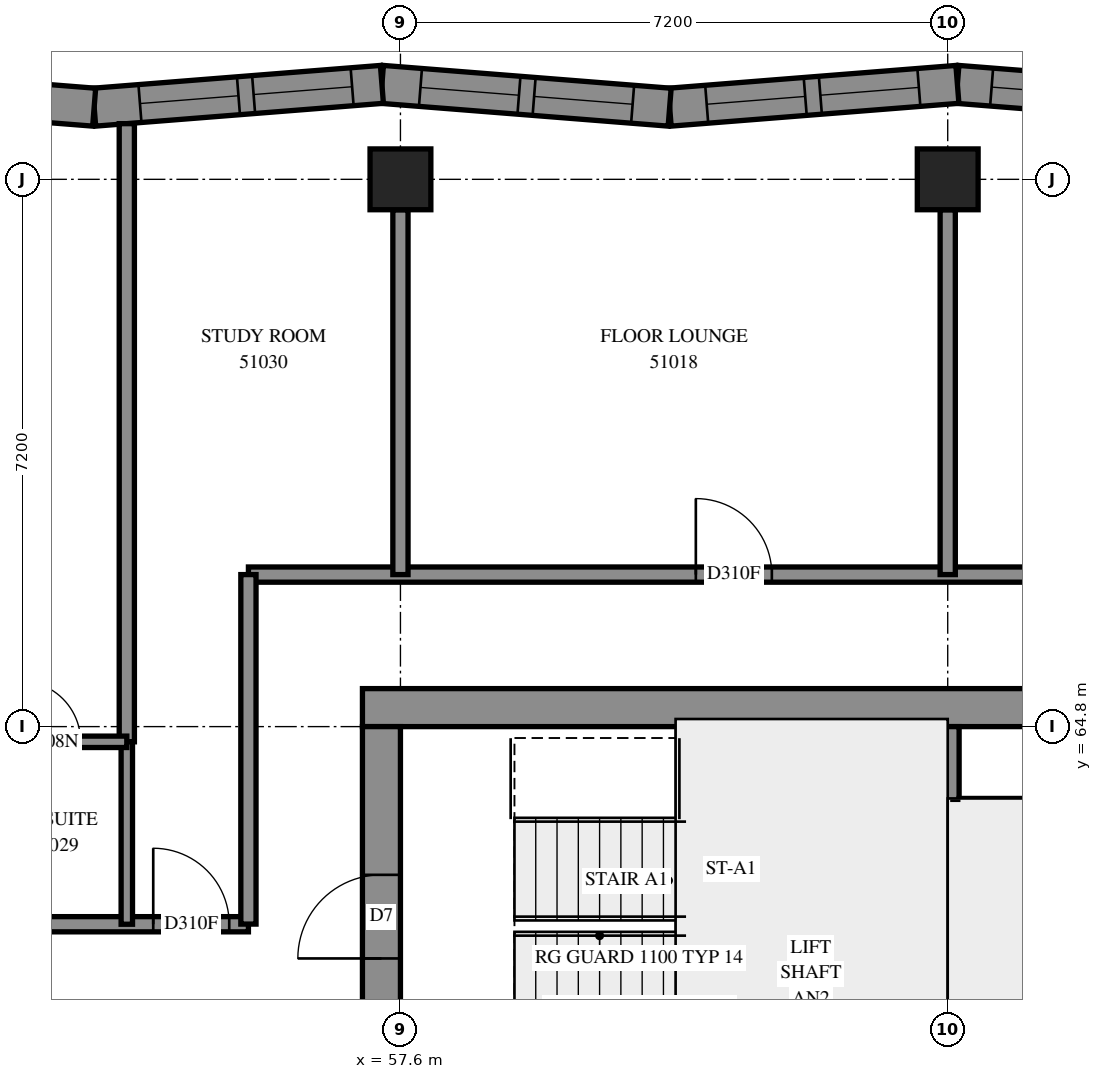
"""IFC4 building model, lengths in metres.
Left out: names, types, materials, properties, quantities, classifications, styles, units other than length and angle.
Written with IfcOpenShell. Run it as: python <this file> out.ifc"""

import sys

from ifc_helpers import new_model, si_unit, direction, frame, frame_2d, origin, origin_2d, place, context, subcontext, project, spatial, polyline, rectangle, outline, extrude, element, fill, save


model = new_model("IFC4")
c1 = context("Model", 3, precision=1e-05, world=origin(), true_north=direction((0.0, 1.0)))
c2 = subcontext(c1, "Body", "Model", "MODEL_VIEW")
j1 = project(units=[si_unit("LENGTHUNIT", "METRE"), si_unit("PLANEANGLEUNIT", "RADIAN")], contexts=[c1])
p1 = place(None, origin())
s1 = spatial("IfcSite", under=j1, at=p1, CompositionType="ELEMENT")
p2 = place(p1, origin())
s2 = spatial("IfcBuilding", under=s1, at=p2, CompositionType="ELEMENT")
p3 = place(p2, frame((0.0, 0.0, 189.6)))
s3 = spatial("IfcBuildingStorey", under=s2, at=p3, CompositionType="ELEMENT", Elevation=189.6)
for number, where, z_axis, x_axis in (
    (1, (57.6, 72.0, 0.0), (0.0, 0.0, 1.0), (1.0, 0.0, 0.0)),
    (2, (64.8, 72.0, 0.0), (0.0, 0.0, 1.0), (1.0, 0.0, 0.0)),
):
    element("IfcColumn", number, at=place(p3, frame(where, z_axis=z_axis, x_axis=x_axis)), inside=s3, PredefinedType="COLUMN", context=c2, shape_type="SweptSolid", body=[
        extrude(rectangle(XDim=0.8, YDim=0.8, at=origin_2d()), origin(), (0.0, 0.0, 1.0), 3.1),
    ])
p4 = place(p3, frame((57.1, 65.05, -0.3), z_axis=(0.0, 0.0, 1.0), x_axis=(1.0, 0.0, 0.0)))
e3 = element("IfcWall", 3, at=p4, inside=s3, PredefinedType="SHEAR", context=c2, shape_type="SweptSolid", body=[
    extrude(rectangle(XDim=15.4, YDim=0.5, at=frame_2d((7.7, 0.0))), origin(), (0.0, 0.0, 1.0), 2.7),
])
p5 = place(p4, frame((10.5, 0.0, 0.3)))
e4 = element("IfcOpeningElement", 4, at=p5, cuts=e3, PredefinedType="OPENING", context=c2, shape_type="SweptSolid", body=[
    extrude(rectangle(XDim=0.8, YDim=2.1, at=frame_2d((0.4, 1.05))), frame((0.0, 0.26, 0.0), z_axis=(0.0, -1.0, 0.0), x_axis=(1.0, 0.0, 0.0)), (0.0, 0.0, 1.0), 0.52),
])
p6 = place(p3, frame((57.35, 50.4, -0.3), z_axis=(0.0, 0.0, 1.0), x_axis=(0.0, 1.0, 0.0)))
e5 = element("IfcWall", 5, at=p6, inside=s3, PredefinedType="SHEAR", context=c2, shape_type="SweptSolid", body=[
    extrude(rectangle(XDim=14.4, YDim=0.5, at=frame_2d((7.2, 0.0))), origin(), (0.0, 0.0, 1.0), 2.7),
])
p7 = place(p6, frame((4.55, 0.0, 0.3)))
e6 = element("IfcOpeningElement", 6, at=p7, cuts=e5, PredefinedType="OPENING", context=c2, shape_type="SweptSolid", body=[
    extrude(rectangle(XDim=1.1, YDim=2.1, at=frame_2d((0.55, 1.05))), frame((0.0, 0.26, 0.0), z_axis=(0.0, -1.0, 0.0), x_axis=(1.0, 0.0, 0.0)), (0.0, 0.0, 1.0), 0.52),
])
p8 = place(p6, frame((11.35, 0.0, 0.3)))
e7 = element("IfcOpeningElement", 7, at=p8, cuts=e5, PredefinedType="OPENING", context=c2, shape_type="SweptSolid", body=[
    extrude(rectangle(XDim=1.1, YDim=2.1, at=frame_2d((0.55, 1.05))), frame((0.0, 0.26, 0.0), z_axis=(0.0, -1.0, 0.0), x_axis=(1.0, 0.0, 0.0)), (0.0, 0.0, 1.0), 0.52),
])
p9 = place(p3, frame((64.8, 60.6, 0.0), z_axis=(0.0, 0.0, 1.0), x_axis=(0.0, 1.0, 0.0)))
e8 = element("IfcWall", 8, at=p9, inside=s3, PredefinedType="SOLIDWALL", context=c2, shape_type="SweptSolid", body=[
    extrude(rectangle(XDim=4.2, YDim=0.3, at=frame_2d((2.1, 0.0))), origin(), (0.0, 0.0, 1.0), 3.1),
])
p10 = place(p3, frame((68.713, 72.949, 0.0), z_axis=(0.0, 0.0, 1.0), x_axis=(-0.9968746163, 0.078999996, 0.0)))
e9 = element("IfcWall", 9, at=p10, inside=s3, PredefinedType="SOLIDWALL", context=c2, shape_type="SweptSolid", body=[
    extrude(outline(polyline([(0.02, -0.25), (3.817, -0.25), (3.778, 0.25), (-0.02, 0.25), (0.02, -0.25)])), origin(), (0.0, 0.0, 1.0), 3.1),
])
p11 = place(p10, frame((0.546, 0.0, 0.45)))
e10 = element("IfcOpeningElement", 10, at=p11, cuts=e9, PredefinedType="OPENING", context=c2, shape_type="SweptSolid", body=[
    extrude(rectangle(XDim=1.3, YDim=2.5, at=frame_2d((0.65, 1.25))), frame((0.0, 0.26, 0.0), z_axis=(0.0, -1.0, 0.0), x_axis=(1.0, 0.0, 0.0)), (0.0, 0.0, 1.0), 0.52),
])
p12 = place(p10, frame((2.046, 0.0, 0.45)))
e11 = element("IfcOpeningElement", 11, at=p12, cuts=e9, PredefinedType="OPENING", context=c2, shape_type="SweptSolid", body=[
    extrude(rectangle(XDim=1.3, YDim=2.5, at=frame_2d((0.65, 1.25))), frame((0.0, 0.26, 0.0), z_axis=(0.0, -1.0, 0.0), x_axis=(1.0, 0.0, 0.0)), (0.0, 0.0, 1.0), 0.52),
])
p13 = place(p3, frame((64.927, 73.249, 0.0), z_axis=(0.0, 0.0, 1.0), x_axis=(-0.9968746163, -0.078999996, 0.0)))
e12 = element("IfcWall", 12, at=p13, inside=s3, PredefinedType="SOLIDWALL", context=c2, shape_type="SweptSolid", body=[
    extrude(outline(polyline([(-0.02, -0.25), (3.778, -0.25), (3.817, 0.25), (0.02, 0.25), (-0.02, -0.25)])), origin(), (0.0, 0.0, 1.0), 3.1),
])
p14 = place(p13, frame((0.509, 0.0, 0.45)))
e13 = element("IfcOpeningElement", 13, at=p14, cuts=e12, PredefinedType="OPENING", context=c2, shape_type="SweptSolid", body=[
    extrude(rectangle(XDim=1.3, YDim=2.5, at=frame_2d((0.65, 1.25))), frame((0.0, 0.26, 0.0), z_axis=(0.0, -1.0, 0.0), x_axis=(1.0, 0.0, 0.0)), (0.0, 0.0, 1.0), 0.52),
])
p15 = place(p13, frame((2.009, 0.0, 0.45)))
e14 = element("IfcOpeningElement", 14, at=p15, cuts=e12, PredefinedType="OPENING", context=c2, shape_type="SweptSolid", body=[
    extrude(rectangle(XDim=1.3, YDim=2.5, at=frame_2d((0.65, 1.25))), frame((0.0, 0.26, 0.0), z_axis=(0.0, -1.0, 0.0), x_axis=(1.0, 0.0, 0.0)), (0.0, 0.0, 1.0), 0.52),
])
p16 = place(p3, frame((61.142, 72.949, 0.0), z_axis=(0.0, 0.0, 1.0), x_axis=(-0.9968746163, 0.078999996, 0.0)))
e15 = element("IfcWall", 15, at=p16, inside=s3, PredefinedType="SOLIDWALL", context=c2, shape_type="SweptSolid", body=[
    extrude(outline(polyline([(0.02, -0.25), (3.817, -0.25), (3.778, 0.25), (-0.02, 0.25), (0.02, -0.25)])), origin(), (0.0, 0.0, 1.0), 3.1),
])
p17 = place(p16, frame((0.489, 0.0, 0.45)))
e16 = element("IfcOpeningElement", 16, at=p17, cuts=e15, PredefinedType="OPENING", context=c2, shape_type="SweptSolid", body=[
    extrude(rectangle(XDim=1.3, YDim=2.5, at=frame_2d((0.65, 1.25))), frame((0.0, 0.26, 0.0), z_axis=(0.0, -1.0, 0.0), x_axis=(1.0, 0.0, 0.0)), (0.0, 0.0, 1.0), 0.52),
])
p18 = place(p16, frame((1.989, 0.0, 0.45)))
e17 = element("IfcOpeningElement", 17, at=p18, cuts=e15, PredefinedType="OPENING", context=c2, shape_type="SweptSolid", body=[
    extrude(rectangle(XDim=1.3, YDim=2.5, at=frame_2d((0.65, 1.25))), frame((0.0, 0.26, 0.0), z_axis=(0.0, -1.0, 0.0), x_axis=(1.0, 0.0, 0.0)), (0.0, 0.0, 1.0), 0.52),
])
p19 = place(p3, frame((57.356, 73.249, 0.0), z_axis=(0.0, 0.0, 1.0), x_axis=(-0.9968746163, -0.078999996, 0.0)))
e18 = element("IfcWall", 18, at=p19, inside=s3, PredefinedType="SOLIDWALL", context=c2, shape_type="SweptSolid", body=[
    extrude(outline(polyline([(-0.02, -0.25), (3.778, -0.25), (3.817, 0.25), (0.02, 0.25), (-0.02, -0.25)])), origin(), (0.0, 0.0, 1.0), 3.1),
])
p20 = place(p19, frame((0.393, 0.0, 0.45)))
e19 = element("IfcOpeningElement", 19, at=p20, cuts=e18, PredefinedType="OPENING", context=c2, shape_type="SweptSolid", body=[
    extrude(rectangle(XDim=1.3, YDim=2.5, at=frame_2d((0.65, 1.25))), frame((0.0, 0.26, 0.0), z_axis=(0.0, -1.0, 0.0), x_axis=(1.0, 0.0, 0.0)), (0.0, 0.0, 1.0), 0.52),
])
p21 = place(p19, frame((1.893, 0.0, 0.45)))
e20 = element("IfcOpeningElement", 20, at=p21, cuts=e18, PredefinedType="OPENING", context=c2, shape_type="SweptSolid", body=[
    extrude(rectangle(XDim=1.3, YDim=2.5, at=frame_2d((0.65, 1.25))), frame((0.0, 0.26, 0.0), z_axis=(0.0, -1.0, 0.0), x_axis=(1.0, 0.0, 0.0)), (0.0, 0.0, 1.0), 0.52),
])
p22 = place(p3, frame((53.571, 72.949, 0.0), z_axis=(0.0, 0.0, 1.0), x_axis=(-0.9968747806, 0.0789979222, 0.0)))
e21 = element("IfcWall", 21, at=p22, inside=s3, PredefinedType="SOLIDWALL", context=c2, shape_type="SweptSolid", body=[
    extrude(outline(polyline([(0.02, -0.25), (3.817, -0.25), (3.778, 0.25), (-0.02, 0.25), (0.02, -0.25)])), origin(), (0.0, 0.0, 1.0), 3.1),
])
p23 = place(p22, frame((1.09, 0.0, 0.45)))
e22 = element("IfcOpeningElement", 22, at=p23, cuts=e21, PredefinedType="OPENING", context=c2, shape_type="SweptSolid", body=[
    extrude(rectangle(XDim=1.2, YDim=2.5, at=frame_2d((0.6, 1.25))), frame((0.0, 0.26, 0.0), z_axis=(0.0, -1.0, 0.0), x_axis=(1.0, 0.0, 0.0)), (0.0, 0.0, 1.0), 0.52),
])
p24 = place(p3, frame((64.95, 63.78, 0.0), z_axis=(0.0, 0.0, 1.0), x_axis=(1.0, 0.0, 0.0)))
e23 = element("IfcWall", 23, at=p24, inside=s3, PredefinedType="PARTITIONING", context=c2, shape_type="SweptSolid", body=[
    extrude(rectangle(XDim=5.95, YDim=0.15, at=frame_2d((2.975, 0.0))), origin(), (0.0, 0.0, 1.0), 3.1),
])
p25 = place(p3, frame((55.6, 66.8, 0.0), z_axis=(0.0, 0.0, 1.0), x_axis=(1.0, 0.0, 0.0)))
e24 = element("IfcWall", 24, at=p25, inside=s3, PredefinedType="PARTITIONING", context=c2, shape_type="SweptSolid", body=[
    extrude(rectangle(XDim=18.4, YDim=0.2, at=frame_2d((9.2, 0.0))), origin(), (0.0, 0.0, 1.0), 3.1),
])
p26 = place(p25, frame((5.886, 0.0, 0.0)))
e25 = element("IfcOpeningElement", 25, at=p26, cuts=e24, PredefinedType="OPENING", context=c2, shape_type="SweptSolid", body=[
    extrude(rectangle(XDim=1.0, YDim=2.1, at=frame_2d((0.5, 1.05))), frame((0.0, 0.11, 0.0), z_axis=(0.0, -1.0, 0.0), x_axis=(1.0, 0.0, 0.0)), (0.0, 0.0, 1.0), 0.22),
])
p27 = place(p25, frame((13.389, 0.0, 0.0)))
e26 = element("IfcOpeningElement", 26, at=p27, cuts=e24, PredefinedType="OPENING", context=c2, shape_type="SweptSolid", body=[
    extrude(rectangle(XDim=1.0, YDim=2.1, at=frame_2d((0.5, 1.05))), frame((0.0, 0.11, 0.0), z_axis=(0.0, -1.0, 0.0), x_axis=(1.0, 0.0, 0.0)), (0.0, 0.0, 1.0), 0.22),
])
p28 = place(p3, frame((40.602, 62.2, 0.0), z_axis=(0.0, 0.0, 1.0), x_axis=(1.0, 0.0, 0.0)))
e27 = element("IfcWall", 27, at=p28, inside=s3, PredefinedType="PARTITIONING", context=c2, shape_type="SweptSolid", body=[
    extrude(rectangle(XDim=14.998, YDim=0.2, at=frame_2d((7.499, 0.0))), origin(), (0.0, 0.0, 1.0), 3.1),
])
p29 = place(p28, frame((1.306, 0.0, 0.0)))
e28 = element("IfcOpeningElement", 28, at=p29, cuts=e27, PredefinedType="OPENING", context=c2, shape_type="SweptSolid", body=[
    extrude(rectangle(XDim=0.9, YDim=2.1, at=frame_2d((0.45, 1.05))), frame((0.0, 0.11, 0.0), z_axis=(0.0, -1.0, 0.0), x_axis=(1.0, 0.0, 0.0)), (0.0, 0.0, 1.0), 0.22),
])
p30 = place(p28, frame((8.548, 0.0, 0.0)))
e29 = element("IfcOpeningElement", 29, at=p30, cuts=e27, PredefinedType="OPENING", context=c2, shape_type="SweptSolid", body=[
    extrude(rectangle(XDim=0.9, YDim=2.1, at=frame_2d((0.45, 1.05))), frame((0.0, 0.11, 0.0), z_axis=(0.0, -1.0, 0.0), x_axis=(1.0, 0.0, 0.0)), (0.0, 0.0, 1.0), 0.22),
])
p31 = place(p28, frame((10.198, 0.0, 0.0)))
e30 = element("IfcOpeningElement", 30, at=p31, cuts=e27, PredefinedType="OPENING", context=c2, shape_type="SweptSolid", body=[
    extrude(rectangle(XDim=0.9, YDim=2.1, at=frame_2d((0.45, 1.05))), frame((0.0, 0.11, 0.0), z_axis=(0.0, -1.0, 0.0), x_axis=(1.0, 0.0, 0.0)), (0.0, 0.0, 1.0), 0.22),
])
p32 = place(p28, frame((13.746, 0.0, 0.0)))
e31 = element("IfcOpeningElement", 31, at=p32, cuts=e27, PredefinedType="OPENING", context=c2, shape_type="SweptSolid", body=[
    extrude(rectangle(XDim=1.0, YDim=2.1, at=frame_2d((0.5, 1.05))), frame((0.0, 0.11, 0.0), z_axis=(0.0, -1.0, 0.0), x_axis=(1.0, 0.0, 0.0)), (0.0, 0.0, 1.0), 0.22),
])
p33 = place(p3, frame((54.0, 64.6, 0.0), z_axis=(0.0, 0.0, 1.0), x_axis=(0.0, 1.0, 0.0)))
e32 = element("IfcWall", 32, at=p33, inside=s3, PredefinedType="PARTITIONING", context=c2, shape_type="SweptSolid", body=[
    extrude(rectangle(XDim=8.133, YDim=0.2, at=frame_2d((4.066, 0.0))), origin(), (0.0, 0.0, 1.0), 3.1),
])
for number, where, z_axis, x_axis in (
    (33, (57.6, 66.8, 0.0), (0.0, 0.0, 1.0), (0.0, 1.0, 0.0)),
    (34, (64.8, 66.8, 0.0), (0.0, 0.0, 1.0), (0.0, 1.0, 0.0)),
):
    element("IfcWall", number, at=place(p3, frame(where, z_axis=z_axis, x_axis=x_axis)), inside=s3, PredefinedType="PARTITIONING", context=c2, shape_type="SweptSolid", body=[
        extrude(rectangle(XDim=4.8, YDim=0.2, at=frame_2d((2.4, 0.0))), origin(), (0.0, 0.0, 1.0), 3.1),
    ])
p34 = place(p3, frame((55.6, 62.202, 0.0), z_axis=(0.0, 0.0, 1.0), x_axis=(0.0, 1.0, 0.0)))
e35 = element("IfcWall", 35, at=p34, inside=s3, PredefinedType="PARTITIONING", context=c2, shape_type="SweptSolid", body=[
    extrude(rectangle(XDim=4.598, YDim=0.2, at=frame_2d((2.299, 0.0))), origin(), (0.0, 0.0, 1.0), 3.1),
])
p35 = place(p3, frame((54.0, 62.2, 0.0), z_axis=(0.0, 0.0, 1.0), x_axis=(0.0, 1.0, 0.0)))
e36 = element("IfcWall", 36, at=p35, inside=s3, PredefinedType="PARTITIONING", context=c2, shape_type="SweptSolid", body=[
    extrude(rectangle(XDim=2.4, YDim=0.15, at=frame_2d((1.2, 0.0))), origin(), (0.0, 0.0, 1.0), 3.1),
])
p36 = place(p3, frame((52.1, 64.6, 0.0), z_axis=(0.0, 0.0, 1.0), x_axis=(1.0, 0.0, 0.0)))
e37 = element("IfcWall", 37, at=p36, inside=s3, PredefinedType="PARTITIONING", context=c2, shape_type="SweptSolid", body=[
    extrude(rectangle(XDim=1.9, YDim=0.15, at=frame_2d((0.95, 0.0))), origin(), (0.0, 0.0, 1.0), 3.1),
])
p37 = place(p36, frame((0.493, 0.0, 0.0)))
e38 = element("IfcOpeningElement", 38, at=p37, cuts=e37, PredefinedType="OPENING", context=c2, shape_type="SweptSolid", body=[
    extrude(rectangle(XDim=0.8, YDim=2.1, at=frame_2d((0.4, 1.05))), frame((0.0, 0.085, 0.0), z_axis=(0.0, -1.0, 0.0), x_axis=(1.0, 0.0, 0.0)), (0.0, 0.0, 1.0), 0.17),
])
p38 = place(p12, origin())
e39 = element("IfcWindow", 39, at=p38, inside=s3, PartitioningType="SINGLE_PANEL", PredefinedType="WINDOW", context=c2, shape_type="SweptSolid", body=[
    extrude(rectangle(XDim=1.3, YDim=2.5, at=frame_2d((0.65, 1.25))), frame((0.0, 0.18, 0.0), z_axis=(0.0, -1.0, 0.0), x_axis=(1.0, 0.0, 0.0)), (0.0, 0.0, 1.0), 0.06),
])
fill(e11, e39)
p39 = place(p14, origin())
e40 = element("IfcWindow", 40, at=p39, inside=s3, PartitioningType="SINGLE_PANEL", PredefinedType="WINDOW", context=c2, shape_type="SweptSolid", body=[
    extrude(rectangle(XDim=1.3, YDim=2.5, at=frame_2d((0.65, 1.25))), frame((0.0, 0.18, 0.0), z_axis=(0.0, -1.0, 0.0), x_axis=(1.0, 0.0, 0.0)), (0.0, 0.0, 1.0), 0.06),
])
fill(e13, e40)
p40 = place(p15, origin())
e41 = element("IfcWindow", 41, at=p40, inside=s3, PartitioningType="SINGLE_PANEL", PredefinedType="WINDOW", context=c2, shape_type="SweptSolid", body=[
    extrude(rectangle(XDim=1.3, YDim=2.5, at=frame_2d((0.65, 1.25))), frame((0.0, 0.18, 0.0), z_axis=(0.0, -1.0, 0.0), x_axis=(1.0, 0.0, 0.0)), (0.0, 0.0, 1.0), 0.06),
])
fill(e14, e41)
p41 = place(p17, origin())
e42 = element("IfcWindow", 42, at=p41, inside=s3, PartitioningType="SINGLE_PANEL", PredefinedType="WINDOW", context=c2, shape_type="SweptSolid", body=[
    extrude(rectangle(XDim=1.3, YDim=2.5, at=frame_2d((0.65, 1.25))), frame((0.0, 0.18, 0.0), z_axis=(0.0, -1.0, 0.0), x_axis=(1.0, 0.0, 0.0)), (0.0, 0.0, 1.0), 0.06),
])
fill(e16, e42)
p42 = place(p18, origin())
e43 = element("IfcWindow", 43, at=p42, inside=s3, PartitioningType="SINGLE_PANEL", PredefinedType="WINDOW", context=c2, shape_type="SweptSolid", body=[
    extrude(rectangle(XDim=1.3, YDim=2.5, at=frame_2d((0.65, 1.25))), frame((0.0, 0.18, 0.0), z_axis=(0.0, -1.0, 0.0), x_axis=(1.0, 0.0, 0.0)), (0.0, 0.0, 1.0), 0.06),
])
fill(e17, e43)
p43 = place(p20, origin())
e44 = element("IfcWindow", 44, at=p43, inside=s3, PartitioningType="SINGLE_PANEL", PredefinedType="WINDOW", context=c2, shape_type="SweptSolid", body=[
    extrude(rectangle(XDim=1.3, YDim=2.5, at=frame_2d((0.65, 1.25))), frame((0.0, 0.18, 0.0), z_axis=(0.0, -1.0, 0.0), x_axis=(1.0, 0.0, 0.0)), (0.0, 0.0, 1.0), 0.06),
])
fill(e19, e44)
p44 = place(p21, origin())
e45 = element("IfcWindow", 45, at=p44, inside=s3, PartitioningType="SINGLE_PANEL", PredefinedType="WINDOW", context=c2, shape_type="SweptSolid", body=[
    extrude(rectangle(XDim=1.3, YDim=2.5, at=frame_2d((0.65, 1.25))), frame((0.0, 0.18, 0.0), z_axis=(0.0, -1.0, 0.0), x_axis=(1.0, 0.0, 0.0)), (0.0, 0.0, 1.0), 0.06),
])
fill(e20, e45)
p45 = place(p8, origin())
e46 = element("IfcDoor", 46, at=p45, inside=s3, OperationType="SINGLE_SWING_LEFT", PredefinedType="DOOR", context=c2, shape_type="SweptSolid", body=[
    extrude(rectangle(XDim=1.1, YDim=2.1, at=frame_2d((0.55, 1.05))), frame((0.0, 0.025, 0.0), z_axis=(0.0, -1.0, 0.0), x_axis=(1.0, 0.0, 0.0)), (0.0, 0.0, 1.0), 0.05),
])
fill(e7, e46)
p46 = place(p26, origin())
e47 = element("IfcDoor", 47, at=p46, inside=s3, OperationType="SINGLE_SWING_RIGHT", PredefinedType="DOOR", context=c2, shape_type="SweptSolid", body=[
    extrude(rectangle(XDim=1.0, YDim=2.1, at=frame_2d((0.5, 1.05))), frame((0.0, 0.025, 0.0), z_axis=(0.0, -1.0, 0.0), x_axis=(1.0, 0.0, 0.0)), (0.0, 0.0, 1.0), 0.05),
])
fill(e25, e47)
p47 = place(p37, origin())
e48 = element("IfcDoor", 48, at=p47, inside=s3, OperationType="SINGLE_SWING_RIGHT", PredefinedType="DOOR", context=c2, shape_type="SweptSolid", body=[
    extrude(rectangle(XDim=0.8, YDim=2.1, at=frame_2d((0.4, 1.05))), frame((0.0, 0.025, 0.0), z_axis=(0.0, -1.0, 0.0), x_axis=(1.0, 0.0, 0.0)), (0.0, 0.0, 1.0), 0.05),
])
fill(e38, e48)
p48 = place(p32, origin())
e49 = element("IfcDoor", 49, at=p48, inside=s3, OperationType="SINGLE_SWING_LEFT", PredefinedType="DOOR", context=c2, shape_type="SweptSolid", body=[
    extrude(rectangle(XDim=1.0, YDim=2.1, at=frame_2d((0.5, 1.05))), frame((0.0, 0.025, 0.0), z_axis=(0.0, -1.0, 0.0), x_axis=(1.0, 0.0, 0.0)), (0.0, 0.0, 1.0), 0.05),
])
fill(e31, e49)
save(model, sys.argv[1])
